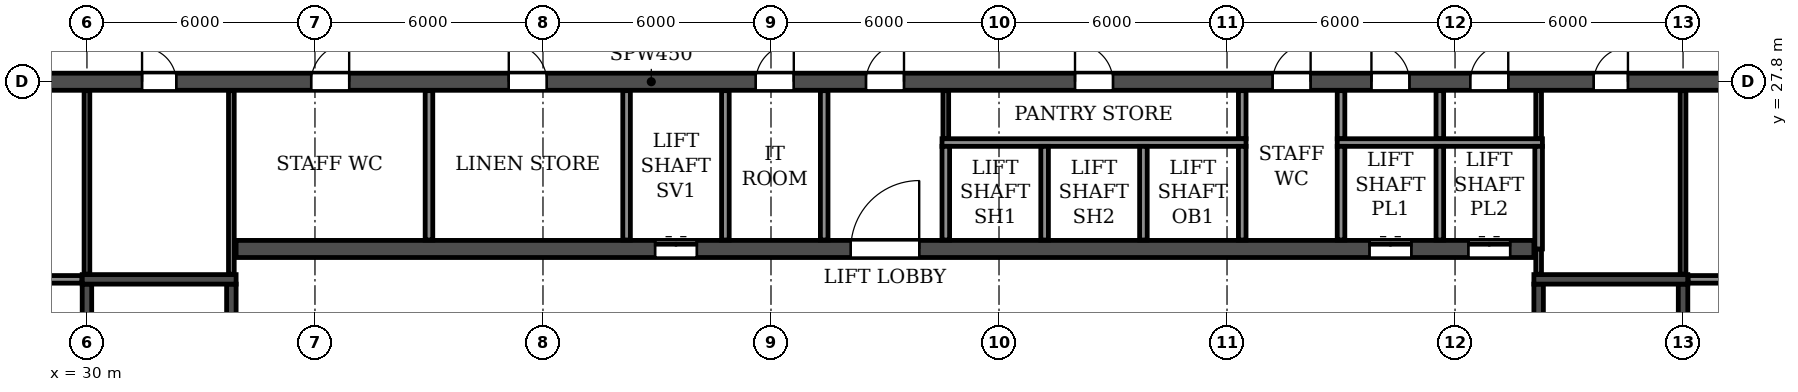
"""IFC4 building model, lengths in metres.
Left out: names, types, materials, properties, quantities, classifications, styles, units other than length and angle.
Written with IfcOpenShell. Run it as: python <this file> out.ifc"""

import sys

from ifc_helpers import new_model, si_unit, direction, frame, frame_2d, origin, place, context, subcontext, project, spatial, rectangle, extrude, element, fill, save


model = new_model("IFC4")
c1 = context("Model", 3, precision=1e-05, world=origin(), true_north=direction((0.0, 1.0)))
c2 = subcontext(c1, "Body", "Model", "MODEL_VIEW")
j1 = project(units=[si_unit("LENGTHUNIT", "METRE"), si_unit("PLANEANGLEUNIT", "RADIAN")], contexts=[c1])
p1 = place(None, origin())
s1 = spatial("IfcSite", under=j1, at=p1, CompositionType="ELEMENT")
p2 = place(p1, origin())
s2 = spatial("IfcBuilding", under=s1, at=p2, CompositionType="ELEMENT")
p3 = place(p2, frame((0.0, 0.0, 6.0)))
s3 = spatial("IfcBuildingStorey", under=s2, at=p3, CompositionType="ELEMENT", Elevation=6.0)
p4 = place(p3, frame((18.0, 27.8, 0.0), z_axis=(0.0, 0.0, 1.0), x_axis=(1.0, 0.0, 0.0)))
e1 = element("IfcWall", 1, at=p4, inside=s3, PredefinedType="SOLIDWALL", context=c2, shape_type="SweptSolid", body=[
    extrude(rectangle(XDim=66.0, YDim=0.45, at=frame_2d((33.0, 0.0))), origin(), (0.0, 0.0, 1.0), 4.52),
])
p5 = place(p4, frame((0.9, 0.0, 0.0)))
e2 = element("IfcOpeningElement", 2, at=p5, cuts=e1, PredefinedType="OPENING", context=c2, shape_type="SweptSolid", body=[
    extrude(rectangle(XDim=1.0, YDim=2.1, at=frame_2d((0.5, 1.05))), frame((0.0, 0.235, 0.0), z_axis=(0.0, -1.0, 0.0), x_axis=(1.0, 0.0, 0.0)), (0.0, 0.0, 1.0), 0.47),
])
p6 = place(p4, frame((4.25, 0.0, 0.0)))
e3 = element("IfcOpeningElement", 3, at=p6, cuts=e1, PredefinedType="OPENING", context=c2, shape_type="SweptSolid", body=[
    extrude(rectangle(XDim=0.9, YDim=2.1, at=frame_2d((0.45, 1.05))), frame((0.0, 0.235, 0.0), z_axis=(0.0, -1.0, 0.0), x_axis=(1.0, 0.0, 0.0)), (0.0, 0.0, 1.0), 0.47),
])
p7 = place(p4, frame((8.85, 0.0, 0.0)))
e4 = element("IfcOpeningElement", 4, at=p7, cuts=e1, PredefinedType="OPENING", context=c2, shape_type="SweptSolid", body=[
    extrude(rectangle(XDim=0.9, YDim=2.1, at=frame_2d((0.45, 1.05))), frame((0.0, 0.235, 0.0), z_axis=(0.0, -1.0, 0.0), x_axis=(1.0, 0.0, 0.0)), (0.0, 0.0, 1.0), 0.47),
])
p8 = place(p4, frame((13.45, 0.0, 0.0)))
e5 = element("IfcOpeningElement", 5, at=p8, cuts=e1, PredefinedType="OPENING", context=c2, shape_type="SweptSolid", body=[
    extrude(rectangle(XDim=0.9, YDim=2.1, at=frame_2d((0.45, 1.05))), frame((0.0, 0.235, 0.0), z_axis=(0.0, -1.0, 0.0), x_axis=(1.0, 0.0, 0.0)), (0.0, 0.0, 1.0), 0.47),
])
p9 = place(p4, frame((17.9, 0.0, 0.0)))
e6 = element("IfcOpeningElement", 6, at=p9, cuts=e1, PredefinedType="OPENING", context=c2, shape_type="SweptSolid", body=[
    extrude(rectangle(XDim=1.0, YDim=2.1, at=frame_2d((0.5, 1.05))), frame((0.0, 0.235, 0.0), z_axis=(0.0, -1.0, 0.0), x_axis=(1.0, 0.0, 0.0)), (0.0, 0.0, 1.0), 0.47),
])
p10 = place(p4, frame((23.1, 0.0, 0.0)))
e7 = element("IfcOpeningElement", 7, at=p10, cuts=e1, PredefinedType="OPENING", context=c2, shape_type="SweptSolid", body=[
    extrude(rectangle(XDim=1.0, YDim=2.1, at=frame_2d((0.5, 1.05))), frame((0.0, 0.235, 0.0), z_axis=(0.0, -1.0, 0.0), x_axis=(1.0, 0.0, 0.0)), (0.0, 0.0, 1.0), 0.47),
])
p11 = place(p4, frame((29.6, 0.0, 0.0)))
e8 = element("IfcOpeningElement", 8, at=p11, cuts=e1, PredefinedType="OPENING", context=c2, shape_type="SweptSolid", body=[
    extrude(rectangle(XDim=1.0, YDim=2.1, at=frame_2d((0.5, 1.05))), frame((0.0, 0.235, 0.0), z_axis=(0.0, -1.0, 0.0), x_axis=(1.0, 0.0, 0.0)), (0.0, 0.0, 1.0), 0.47),
])
p12 = place(p4, frame((32.5, 0.0, 0.0)))
e9 = element("IfcOpeningElement", 9, at=p12, cuts=e1, PredefinedType="OPENING", context=c2, shape_type="SweptSolid", body=[
    extrude(rectangle(XDim=1.0, YDim=2.1, at=frame_2d((0.5, 1.05))), frame((0.0, 0.235, 0.0), z_axis=(0.0, -1.0, 0.0), x_axis=(1.0, 0.0, 0.0)), (0.0, 0.0, 1.0), 0.47),
])
p13 = place(p4, frame((38.0, 0.0, 0.0)))
e10 = element("IfcOpeningElement", 10, at=p13, cuts=e1, PredefinedType="OPENING", context=c2, shape_type="SweptSolid", body=[
    extrude(rectangle(XDim=1.0, YDim=2.1, at=frame_2d((0.5, 1.05))), frame((0.0, 0.235, 0.0), z_axis=(0.0, -1.0, 0.0), x_axis=(1.0, 0.0, 0.0)), (0.0, 0.0, 1.0), 0.47),
])
p14 = place(p4, frame((43.2, 0.0, 0.0)))
e11 = element("IfcOpeningElement", 11, at=p14, cuts=e1, PredefinedType="OPENING", context=c2, shape_type="SweptSolid", body=[
    extrude(rectangle(XDim=1.0, YDim=2.1, at=frame_2d((0.5, 1.05))), frame((0.0, 0.235, 0.0), z_axis=(0.0, -1.0, 0.0), x_axis=(1.0, 0.0, 0.0)), (0.0, 0.0, 1.0), 0.47),
])
p15 = place(p4, frame((45.8, 0.0, 0.0)))
e12 = element("IfcOpeningElement", 12, at=p15, cuts=e1, PredefinedType="OPENING", context=c2, shape_type="SweptSolid", body=[
    extrude(rectangle(XDim=1.0, YDim=2.1, at=frame_2d((0.5, 1.05))), frame((0.0, 0.235, 0.0), z_axis=(0.0, -1.0, 0.0), x_axis=(1.0, 0.0, 0.0)), (0.0, 0.0, 1.0), 0.47),
])
p16 = place(p4, frame((48.4, 0.0, 0.0)))
e13 = element("IfcOpeningElement", 13, at=p16, cuts=e1, PredefinedType="OPENING", context=c2, shape_type="SweptSolid", body=[
    extrude(rectangle(XDim=1.0, YDim=2.1, at=frame_2d((0.5, 1.05))), frame((0.0, 0.235, 0.0), z_axis=(0.0, -1.0, 0.0), x_axis=(1.0, 0.0, 0.0)), (0.0, 0.0, 1.0), 0.47),
])
p17 = place(p4, frame((51.65, 0.0, 0.0)))
e14 = element("IfcOpeningElement", 14, at=p17, cuts=e1, PredefinedType="OPENING", context=c2, shape_type="SweptSolid", body=[
    extrude(rectangle(XDim=0.9, YDim=2.1, at=frame_2d((0.45, 1.05))), frame((0.0, 0.235, 0.0), z_axis=(0.0, -1.0, 0.0), x_axis=(1.0, 0.0, 0.0)), (0.0, 0.0, 1.0), 0.47),
])
p18 = place(p4, frame((56.25, 0.0, 0.0)))
e15 = element("IfcOpeningElement", 15, at=p18, cuts=e1, PredefinedType="OPENING", context=c2, shape_type="SweptSolid", body=[
    extrude(rectangle(XDim=0.9, YDim=2.1, at=frame_2d((0.45, 1.05))), frame((0.0, 0.235, 0.0), z_axis=(0.0, -1.0, 0.0), x_axis=(1.0, 0.0, 0.0)), (0.0, 0.0, 1.0), 0.47),
])
p19 = place(p4, frame((60.85, 0.0, 0.0)))
e16 = element("IfcOpeningElement", 16, at=p19, cuts=e1, PredefinedType="OPENING", context=c2, shape_type="SweptSolid", body=[
    extrude(rectangle(XDim=0.9, YDim=2.1, at=frame_2d((0.45, 1.05))), frame((0.0, 0.235, 0.0), z_axis=(0.0, -1.0, 0.0), x_axis=(1.0, 0.0, 0.0)), (0.0, 0.0, 1.0), 0.47),
])
p20 = place(p4, frame((64.1, 0.0, 0.0)))
e17 = element("IfcOpeningElement", 17, at=p20, cuts=e1, PredefinedType="OPENING", context=c2, shape_type="SweptSolid", body=[
    extrude(rectangle(XDim=1.0, YDim=2.1, at=frame_2d((0.5, 1.05))), frame((0.0, 0.235, 0.0), z_axis=(0.0, -1.0, 0.0), x_axis=(1.0, 0.0, 0.0)), (0.0, 0.0, 1.0), 0.47),
])
p21 = place(p3, frame((33.925, 23.4, 0.0), z_axis=(0.0, 0.0, 1.0), x_axis=(1.0, 0.0, 0.0)))
e18 = element("IfcWall", 18, at=p21, inside=s3, PredefinedType="SOLIDWALL", context=c2, shape_type="SweptSolid", body=[
    extrude(rectangle(XDim=34.15, YDim=0.45, at=frame_2d((17.075, 0.0))), origin(), (0.0, 0.0, 1.0), 4.52),
])
p22 = place(p21, frame((16.175, 0.0, 0.0)))
e19 = element("IfcOpeningElement", 19, at=p22, cuts=e18, PredefinedType="OPENING", context=c2, shape_type="SweptSolid", body=[
    extrude(rectangle(XDim=1.8, YDim=2.1, at=frame_2d((0.9, 1.05))), frame((0.0, 0.235, 0.0), z_axis=(0.0, -1.0, 0.0), x_axis=(1.0, 0.0, 0.0)), (0.0, 0.0, 1.0), 0.47),
])
p23 = place(p21, frame((11.025, 0.0, 0.0)))
e20 = element("IfcOpeningElement", 20, at=p23, cuts=e18, PredefinedType="OPENING", context=c2, shape_type="SweptSolid", body=[
    extrude(rectangle(XDim=1.1, YDim=2.1, at=frame_2d((0.55, 1.05))), frame((0.0, 0.235, 0.0), z_axis=(0.0, -1.0, 0.0), x_axis=(1.0, 0.0, 0.0)), (0.0, 0.0, 1.0), 0.47),
])
p24 = place(p21, frame((29.825, 0.0, 0.0)))
e21 = element("IfcOpeningElement", 21, at=p24, cuts=e18, PredefinedType="OPENING", context=c2, shape_type="SweptSolid", body=[
    extrude(rectangle(XDim=1.1, YDim=2.1, at=frame_2d((0.55, 1.05))), frame((0.0, 0.235, 0.0), z_axis=(0.0, -1.0, 0.0), x_axis=(1.0, 0.0, 0.0)), (0.0, 0.0, 1.0), 0.47),
])
p25 = place(p21, frame((32.425, 0.0, 0.0)))
e22 = element("IfcOpeningElement", 22, at=p25, cuts=e18, PredefinedType="OPENING", context=c2, shape_type="SweptSolid", body=[
    extrude(rectangle(XDim=1.1, YDim=2.1, at=frame_2d((0.55, 1.05))), frame((0.0, 0.235, 0.0), z_axis=(0.0, -1.0, 0.0), x_axis=(1.0, 0.0, 0.0)), (0.0, 0.0, 1.0), 0.47),
])
p26 = place(p3, frame((30.0, 14.825, 0.0), z_axis=(0.0, 0.0, 1.0), x_axis=(0.0, 1.0, 0.0)))
e23 = element("IfcWall", 23, at=p26, inside=s3, PredefinedType="SOLIDWALL", context=c2, shape_type="SweptSolid", body=[
    extrude(rectangle(XDim=7.65, YDim=0.25, at=frame_2d((3.825, 0.0))), origin(), (0.0, 0.0, 1.0), 4.52),
])
p27 = place(p3, frame((33.8, 14.825, 0.0), z_axis=(0.0, 0.0, 1.0), x_axis=(0.0, 1.0, 0.0)))
e24 = element("IfcWall", 24, at=p27, inside=s3, PredefinedType="SOLIDWALL", context=c2, shape_type="SweptSolid", body=[
    extrude(rectangle(XDim=7.65, YDim=0.25, at=frame_2d((3.825, 0.0))), origin(), (0.0, 0.0, 1.0), 4.52),
])
p28 = place(p27, frame((0.475, 0.0, 0.0)))
e25 = element("IfcOpeningElement", 25, at=p28, cuts=e24, PredefinedType="OPENING", context=c2, shape_type="SweptSolid", body=[
    extrude(rectangle(XDim=1.0, YDim=2.1, at=frame_2d((0.5, 1.05))), frame((0.0, 0.135, 0.0), z_axis=(0.0, -1.0, 0.0), x_axis=(1.0, 0.0, 0.0)), (0.0, 0.0, 1.0), 0.27),
])
p29 = place(p3, frame((29.875, 22.6, 0.0), z_axis=(0.0, 0.0, 1.0), x_axis=(1.0, 0.0, 0.0)))
e26 = element("IfcWall", 26, at=p29, inside=s3, PredefinedType="SOLIDWALL", context=c2, shape_type="SweptSolid", body=[
    extrude(rectangle(XDim=4.05, YDim=0.25, at=frame_2d((2.025, 0.0))), origin(), (0.0, 0.0, 1.0), 4.52),
])
p30 = place(p3, frame((68.2, 14.825, 0.0), z_axis=(0.0, 0.0, 1.0), x_axis=(0.0, 1.0, 0.0)))
e27 = element("IfcWall", 27, at=p30, inside=s3, PredefinedType="SOLIDWALL", context=c2, shape_type="SweptSolid", body=[
    extrude(rectangle(XDim=7.65, YDim=0.25, at=frame_2d((3.825, 0.0))), origin(), (0.0, 0.0, 1.0), 4.52),
])
p31 = place(p30, frame((0.475, 0.0, 0.0)))
e28 = element("IfcOpeningElement", 28, at=p31, cuts=e27, PredefinedType="OPENING", context=c2, shape_type="SweptSolid", body=[
    extrude(rectangle(XDim=1.0, YDim=2.1, at=frame_2d((0.5, 1.05))), frame((0.0, 0.135, 0.0), z_axis=(0.0, -1.0, 0.0), x_axis=(1.0, 0.0, 0.0)), (0.0, 0.0, 1.0), 0.27),
])
p32 = place(p3, frame((72.0, 14.825, 0.0), z_axis=(0.0, 0.0, 1.0), x_axis=(0.0, 1.0, 0.0)))
e29 = element("IfcWall", 29, at=p32, inside=s3, PredefinedType="SOLIDWALL", context=c2, shape_type="SweptSolid", body=[
    extrude(rectangle(XDim=7.65, YDim=0.25, at=frame_2d((3.825, 0.0))), origin(), (0.0, 0.0, 1.0), 4.52),
])
p33 = place(p3, frame((68.075, 22.6, 0.0), z_axis=(0.0, 0.0, 1.0), x_axis=(1.0, 0.0, 0.0)))
e30 = element("IfcWall", 30, at=p33, inside=s3, PredefinedType="SOLIDWALL", context=c2, shape_type="SweptSolid", body=[
    extrude(rectangle(XDim=4.05, YDim=0.25, at=frame_2d((2.025, 0.0))), origin(), (0.0, 0.0, 1.0), 4.52),
])
p34 = place(p3, frame((52.6, 26.3, 0.0), z_axis=(0.0, 0.0, 1.0), x_axis=(0.0, 1.0, 0.0)))
e31 = element("IfcWall", 31, at=p34, inside=s3, PredefinedType="PARTITIONING", context=c2, shape_type="SweptSolid", body=[
    extrude(rectangle(XDim=1.265, YDim=0.15, at=frame_2d((0.632, 0.0))), origin(), (0.0, 0.0, 1.0), 4.52),
])
p35 = place(p3, frame((49.4, 23.635, 0.0), z_axis=(0.0, 0.0, 1.0), x_axis=(0.0, 1.0, 0.0)))
e32 = element("IfcWall", 32, at=p35, inside=s3, PredefinedType="PARTITIONING", context=c2, shape_type="SweptSolid", body=[
    extrude(rectangle(XDim=3.93, YDim=0.2, at=frame_2d((1.965, 0.0))), origin(), (0.0, 0.0, 1.0), 4.52),
])
p36 = place(p3, frame((65.6, 26.3, 0.0), z_axis=(0.0, 0.0, 1.0), x_axis=(0.0, 1.0, 0.0)))
e33 = element("IfcWall", 33, at=p36, inside=s3, PredefinedType="PARTITIONING", context=c2, shape_type="SweptSolid", body=[
    extrude(rectangle(XDim=1.265, YDim=0.2, at=frame_2d((0.632, 0.0))), origin(), (0.0, 0.0, 1.0), 4.52),
])
for number, where, z_axis, x_axis in (
    (34, (24.735, 22.6, 0.0), (0.0, 0.0, 1.0), (1.0, 0.0, 0.0)),
    (35, (72.135, 22.6, 0.0), (0.0, 0.0, 1.0), (1.0, 0.0, 0.0)),
):
    element("IfcWall", number, at=place(p3, frame(where, z_axis=z_axis, x_axis=x_axis)), inside=s3, PredefinedType="PARTITIONING", context=c2, shape_type="SweptSolid", body=[
        extrude(rectangle(XDim=5.13, YDim=0.2, at=frame_2d((2.565, 0.0))), origin(), (0.0, 0.0, 1.0), 4.52),
    ])
p37 = place(p3, frame((39.0, 23.635, 0.0), z_axis=(0.0, 0.0, 1.0), x_axis=(0.0, 1.0, 0.0)))
e36 = element("IfcWall", 36, at=p37, inside=s3, PredefinedType="PARTITIONING", context=c2, shape_type="SweptSolid", body=[
    extrude(rectangle(XDim=3.93, YDim=0.2, at=frame_2d((1.965, 0.0))), origin(), (0.0, 0.0, 1.0), 4.52),
])
for number, where, z_axis, x_axis in (
    (37, (60.4, 26.3, 0.0), (0.0, 0.0, 1.0), (0.0, 1.0, 0.0)),
    (38, (63.0, 26.3, 0.0), (0.0, 0.0, 1.0), (0.0, 1.0, 0.0)),
):
    element("IfcWall", number, at=place(p3, frame(where, z_axis=z_axis, x_axis=x_axis)), inside=s3, PredefinedType="PARTITIONING", context=c2, shape_type="SweptSolid", body=[
        extrude(rectangle(XDim=1.265, YDim=0.2, at=frame_2d((0.632, 0.0))), origin(), (0.0, 0.0, 1.0), 4.52),
    ])
for number, where, z_axis, x_axis in (
    (39, (30.0, 22.735, 0.0), (0.0, 0.0, 1.0), (0.0, 1.0, 0.0)),
    (40, (33.8, 22.735, 0.0), (0.0, 0.0, 1.0), (0.0, 1.0, 0.0)),
):
    element("IfcWall", number, at=place(p3, frame(where, z_axis=z_axis, x_axis=x_axis)), inside=s3, PredefinedType="PARTITIONING", context=c2, shape_type="SweptSolid", body=[
        extrude(rectangle(XDim=4.83, YDim=0.15, at=frame_2d((2.415, 0.0))), origin(), (0.0, 0.0, 1.0), 4.52),
    ])
p38 = place(p3, frame((68.2, 22.735, 0.0), z_axis=(0.0, 0.0, 1.0), x_axis=(0.0, 1.0, 0.0)))
e41 = element("IfcWall", 41, at=p38, inside=s3, PredefinedType="PARTITIONING", context=c2, shape_type="SweptSolid", body=[
    extrude(rectangle(XDim=0.665, YDim=0.15, at=frame_2d((0.333, 0.0))), origin(), (0.0, 0.0, 1.0), 4.52),
])
p39 = place(p3, frame((68.2, 26.3, 0.0), z_axis=(0.0, 0.0, 1.0), x_axis=(0.0, 1.0, 0.0)))
e42 = element("IfcWall", 42, at=p39, inside=s3, PredefinedType="PARTITIONING", context=c2, shape_type="SweptSolid", body=[
    extrude(rectangle(XDim=1.265, YDim=0.15, at=frame_2d((0.632, 0.0))), origin(), (0.0, 0.0, 1.0), 4.52),
])
p40 = place(p3, frame((72.0, 22.735, 0.0), z_axis=(0.0, 0.0, 1.0), x_axis=(0.0, 1.0, 0.0)))
e43 = element("IfcWall", 43, at=p40, inside=s3, PredefinedType="PARTITIONING", context=c2, shape_type="SweptSolid", body=[
    extrude(rectangle(XDim=4.83, YDim=0.15, at=frame_2d((2.415, 0.0))), origin(), (0.0, 0.0, 1.0), 4.52),
])
p41 = place(p3, frame((52.5, 26.2, 0.0), z_axis=(0.0, 0.0, 1.0), x_axis=(1.0, 0.0, 0.0)))
e44 = element("IfcWall", 44, at=p41, inside=s3, PredefinedType="PARTITIONING", context=c2, shape_type="SweptSolid", body=[
    extrude(rectangle(XDim=8.0, YDim=0.2, at=frame_2d((4.0, 0.0))), origin(), (0.0, 0.0, 1.0), 4.52),
])
p42 = place(p3, frame((62.9, 26.2, 0.0), z_axis=(0.0, 0.0, 1.0), x_axis=(1.0, 0.0, 0.0)))
e45 = element("IfcWall", 45, at=p42, inside=s3, PredefinedType="PARTITIONING", context=c2, shape_type="SweptSolid", body=[
    extrude(rectangle(XDim=5.4, YDim=0.2, at=frame_2d((2.7, 0.0))), origin(), (0.0, 0.0, 1.0), 4.52),
])
for number, where, z_axis, x_axis in (
    (46, (44.2, 23.635, 0.0), (0.0, 0.0, 1.0), (0.0, 1.0, 0.0)),
    (47, (46.8, 23.635, 0.0), (0.0, 0.0, 1.0), (0.0, 1.0, 0.0)),
):
    element("IfcWall", number, at=place(p3, frame(where, z_axis=z_axis, x_axis=x_axis)), inside=s3, PredefinedType="PARTITIONING", context=c2, shape_type="SweptSolid", body=[
        extrude(rectangle(XDim=3.93, YDim=0.2, at=frame_2d((1.965, 0.0))), origin(), (0.0, 0.0, 1.0), 4.52),
    ])
for number, where, z_axis, x_axis in (
    (48, (52.6, 23.635, 0.0), (0.0, 0.0, 1.0), (0.0, 1.0, 0.0)),
    (49, (55.2, 23.635, 0.0), (0.0, 0.0, 1.0), (0.0, 1.0, 0.0)),
    (50, (57.8, 23.635, 0.0), (0.0, 0.0, 1.0), (0.0, 1.0, 0.0)),
    (51, (60.4, 23.635, 0.0), (0.0, 0.0, 1.0), (0.0, 1.0, 0.0)),
    (52, (63.0, 23.635, 0.0), (0.0, 0.0, 1.0), (0.0, 1.0, 0.0)),
    (53, (65.6, 23.635, 0.0), (0.0, 0.0, 1.0), (0.0, 1.0, 0.0)),
):
    element("IfcWall", number, at=place(p3, frame(where, z_axis=z_axis, x_axis=x_axis)), inside=s3, PredefinedType="PARTITIONING", context=c2, shape_type="SweptSolid", body=[
        extrude(rectangle(XDim=2.465, YDim=0.2, at=frame_2d((1.232, 0.0))), origin(), (0.0, 0.0, 1.0), 4.52),
    ])
p43 = place(p3, frame((68.2, 23.4, 0.0), z_axis=(0.0, 0.0, 1.0), x_axis=(0.0, 1.0, 0.0)))
e54 = element("IfcWall", 54, at=p43, inside=s3, PredefinedType="PARTITIONING", context=c2, shape_type="SweptSolid", body=[
    extrude(rectangle(XDim=2.7, YDim=0.2, at=frame_2d((1.35, 0.0))), origin(), (0.0, 0.0, 1.0), 4.52),
])
p44 = place(p8, origin())
e55 = element("IfcDoor", 55, at=p44, inside=s3, OperationType="SINGLE_SWING_LEFT", PredefinedType="DOOR", context=c2, shape_type="SweptSolid", body=[
    extrude(rectangle(XDim=0.9, YDim=2.1, at=frame_2d((0.45, 1.05))), frame((0.0, 0.025, 0.0), z_axis=(0.0, -1.0, 0.0), x_axis=(1.0, 0.0, 0.0)), (0.0, 0.0, 1.0), 0.05),
])
fill(e5, e55)
p45 = place(p9, origin())
e56 = element("IfcDoor", 56, at=p45, inside=s3, OperationType="SINGLE_SWING_RIGHT", PredefinedType="DOOR", context=c2, shape_type="SweptSolid", body=[
    extrude(rectangle(XDim=1.0, YDim=2.1, at=frame_2d((0.5, 1.05))), frame((0.0, 0.025, 0.0), z_axis=(0.0, -1.0, 0.0), x_axis=(1.0, 0.0, 0.0)), (0.0, 0.0, 1.0), 0.05),
])
fill(e6, e56)
p46 = place(p10, origin())
e57 = element("IfcDoor", 57, at=p46, inside=s3, OperationType="SINGLE_SWING_LEFT", PredefinedType="DOOR", context=c2, shape_type="SweptSolid", body=[
    extrude(rectangle(XDim=1.0, YDim=2.1, at=frame_2d((0.5, 1.05))), frame((0.0, 0.025, 0.0), z_axis=(0.0, -1.0, 0.0), x_axis=(1.0, 0.0, 0.0)), (0.0, 0.0, 1.0), 0.05),
])
fill(e7, e57)
p47 = place(p11, origin())
e58 = element("IfcDoor", 58, at=p47, inside=s3, OperationType="SINGLE_SWING_RIGHT", PredefinedType="DOOR", context=c2, shape_type="SweptSolid", body=[
    extrude(rectangle(XDim=1.0, YDim=2.1, at=frame_2d((0.5, 1.05))), frame((0.0, 0.025, 0.0), z_axis=(0.0, -1.0, 0.0), x_axis=(1.0, 0.0, 0.0)), (0.0, 0.0, 1.0), 0.05),
])
fill(e8, e58)
p48 = place(p12, origin())
e59 = element("IfcDoor", 59, at=p48, inside=s3, OperationType="SINGLE_SWING_RIGHT", PredefinedType="DOOR", context=c2, shape_type="SweptSolid", body=[
    extrude(rectangle(XDim=1.0, YDim=2.1, at=frame_2d((0.5, 1.05))), frame((0.0, 0.025, 0.0), z_axis=(0.0, -1.0, 0.0), x_axis=(1.0, 0.0, 0.0)), (0.0, 0.0, 1.0), 0.05),
])
fill(e9, e59)
p49 = place(p13, origin())
e60 = element("IfcDoor", 60, at=p49, inside=s3, OperationType="SINGLE_SWING_LEFT", PredefinedType="DOOR", context=c2, shape_type="SweptSolid", body=[
    extrude(rectangle(XDim=1.0, YDim=2.1, at=frame_2d((0.5, 1.05))), frame((0.0, 0.025, 0.0), z_axis=(0.0, -1.0, 0.0), x_axis=(1.0, 0.0, 0.0)), (0.0, 0.0, 1.0), 0.05),
])
fill(e10, e60)
p50 = place(p14, origin())
e61 = element("IfcDoor", 61, at=p50, inside=s3, OperationType="SINGLE_SWING_RIGHT", PredefinedType="DOOR", context=c2, shape_type="SweptSolid", body=[
    extrude(rectangle(XDim=1.0, YDim=2.1, at=frame_2d((0.5, 1.05))), frame((0.0, 0.025, 0.0), z_axis=(0.0, -1.0, 0.0), x_axis=(1.0, 0.0, 0.0)), (0.0, 0.0, 1.0), 0.05),
])
fill(e11, e61)
p51 = place(p15, origin())
e62 = element("IfcDoor", 62, at=p51, inside=s3, OperationType="SINGLE_SWING_LEFT", PredefinedType="DOOR", context=c2, shape_type="SweptSolid", body=[
    extrude(rectangle(XDim=1.0, YDim=2.1, at=frame_2d((0.5, 1.05))), frame((0.0, 0.025, 0.0), z_axis=(0.0, -1.0, 0.0), x_axis=(1.0, 0.0, 0.0)), (0.0, 0.0, 1.0), 0.05),
])
fill(e12, e62)
p52 = place(p16, origin())
e63 = element("IfcDoor", 63, at=p52, inside=s3, OperationType="SINGLE_SWING_RIGHT", PredefinedType="DOOR", context=c2, shape_type="SweptSolid", body=[
    extrude(rectangle(XDim=1.0, YDim=2.1, at=frame_2d((0.5, 1.05))), frame((0.0, 0.025, 0.0), z_axis=(0.0, -1.0, 0.0), x_axis=(1.0, 0.0, 0.0)), (0.0, 0.0, 1.0), 0.05),
])
fill(e13, e63)
p53 = place(p17, origin())
e64 = element("IfcDoor", 64, at=p53, inside=s3, OperationType="SINGLE_SWING_RIGHT", PredefinedType="DOOR", context=c2, shape_type="SweptSolid", body=[
    extrude(rectangle(XDim=0.9, YDim=2.1, at=frame_2d((0.45, 1.05))), frame((0.0, 0.025, 0.0), z_axis=(0.0, -1.0, 0.0), x_axis=(1.0, 0.0, 0.0)), (0.0, 0.0, 1.0), 0.05),
])
fill(e14, e64)
p54 = place(p22, origin())
e65 = element("IfcDoor", 65, at=p54, inside=s3, OperationType="DOUBLE_DOOR_SINGLE_SWING", PredefinedType="DOOR", context=c2, shape_type="SweptSolid", body=[
    extrude(rectangle(XDim=1.8, YDim=2.1, at=frame_2d((0.9, 1.05))), frame((0.0, 0.025, 0.0), z_axis=(0.0, -1.0, 0.0), x_axis=(1.0, 0.0, 0.0)), (0.0, 0.0, 1.0), 0.05),
])
fill(e19, e65)
p55 = place(p23, origin())
e66 = element("IfcDoor", 66, at=p55, inside=s3, OperationType="DOUBLE_DOOR_SLIDING", PredefinedType="DOOR", context=c2, shape_type="SweptSolid", body=[
    extrude(rectangle(XDim=1.1, YDim=2.1, at=frame_2d((0.55, 1.05))), frame((0.0, 0.025, 0.0), z_axis=(0.0, -1.0, 0.0), x_axis=(1.0, 0.0, 0.0)), (0.0, 0.0, 1.0), 0.05),
])
fill(e20, e66)
p56 = place(p24, origin())
e67 = element("IfcDoor", 67, at=p56, inside=s3, OperationType="DOUBLE_DOOR_SLIDING", PredefinedType="DOOR", context=c2, shape_type="SweptSolid", body=[
    extrude(rectangle(XDim=1.1, YDim=2.1, at=frame_2d((0.55, 1.05))), frame((0.0, 0.025, 0.0), z_axis=(0.0, -1.0, 0.0), x_axis=(1.0, 0.0, 0.0)), (0.0, 0.0, 1.0), 0.05),
])
fill(e21, e67)
p57 = place(p25, origin())
e68 = element("IfcDoor", 68, at=p57, inside=s3, OperationType="DOUBLE_DOOR_SLIDING", PredefinedType="DOOR", context=c2, shape_type="SweptSolid", body=[
    extrude(rectangle(XDim=1.1, YDim=2.1, at=frame_2d((0.55, 1.05))), frame((0.0, 0.025, 0.0), z_axis=(0.0, -1.0, 0.0), x_axis=(1.0, 0.0, 0.0)), (0.0, 0.0, 1.0), 0.05),
])
fill(e22, e68)
save(model, sys.argv[1])
